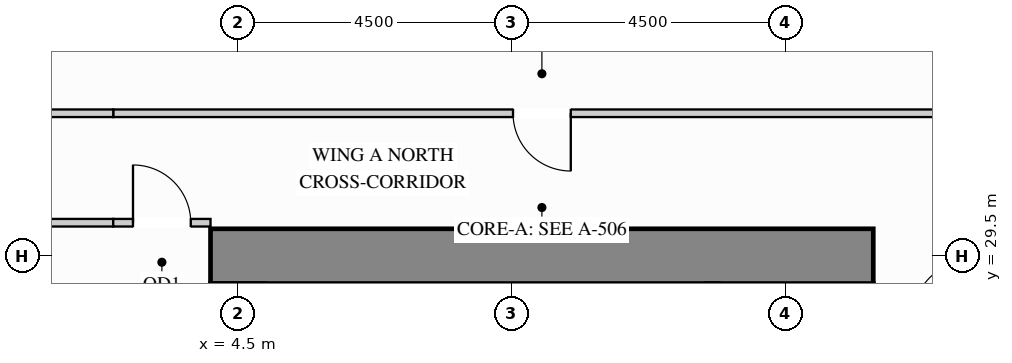
"""IFC4 building model, lengths in metres.
Left out: names, types, materials, properties, quantities, classifications, styles, units other than length and angle.
Written with IfcOpenShell. Run it as: python <this file> out.ifc"""

import sys

from ifc_helpers import new_model, si_unit, direction, frame, frame_2d, origin, place, context, subcontext, project, spatial, rectangle, extrude, source, transform, mapped, element, fill, save


model = new_model("IFC4")
c1 = context("Model", 3, precision=1e-05, world=origin(), true_north=direction((0.0, 1.0)))
c2 = subcontext(c1, "Body", "Model", "MODEL_VIEW")
j1 = project(units=[si_unit("LENGTHUNIT", "METRE"), si_unit("PLANEANGLEUNIT", "RADIAN")], contexts=[c1])
p1 = place(None, origin())
s1 = spatial("IfcSite", under=j1, at=p1, CompositionType="ELEMENT")
p2 = place(p1, origin())
s2 = spatial("IfcBuilding", under=s1, at=p2, CompositionType="ELEMENT")
p3 = place(p2, frame((0.0, 0.0, 51.3)))
s3 = spatial("IfcBuildingStorey", under=s2, at=p3, CompositionType="ELEMENT", Elevation=51.3)
m1 = source(origin(), c2, "Body", "SweptSolid", [
    extrude(rectangle(XDim=10.9, YDim=0.9, at=frame_2d((5.45, 0.0))), origin(), (0.0, 0.0, 1.0), 3.38),
])
p4 = place(p3, frame((4.05, 29.5, 0.0), z_axis=(0.0, 0.0, 1.0), x_axis=(1.0, 0.0, 0.0)))
e1 = element("IfcWall", 1, at=p4, inside=s3, PredefinedType="SHEAR", context=c2, shape_type="MappedRepresentation", body=[
    mapped(m1, transform((0.0, 0.0, 0.0), x_axis=(1.0, 0.0, 0.0), y_axis=(0.0, 1.0, 0.0), z_axis=(0.0, 0.0, 1.0))),
])
p5 = place(p3, frame((2.45, 31.85, 0.0), z_axis=(0.0, 0.0, 1.0), x_axis=(1.0, 0.0, 0.0)))
e2 = element("IfcWall", 2, at=p5, inside=s3, PredefinedType="PARTITIONING", context=c2, shape_type="SweptSolid", body=[
    extrude(rectangle(XDim=14.1, YDim=0.125, at=frame_2d((7.05, 0.0))), origin(), (0.0, 0.0, 1.0), 2.828),
])
p6 = place(p5, frame((6.575, 0.0, 0.0)))
e3 = element("IfcOpeningElement", 3, at=p6, cuts=e2, PredefinedType="OPENING", context=c2, shape_type="SweptSolid", body=[
    extrude(rectangle(XDim=0.95, YDim=2.15, at=frame_2d((0.475, 1.075))), frame((0.0, 0.073, 0.0), z_axis=(0.0, -1.0, 0.0), x_axis=(1.0, 0.0, 0.0)), (0.0, 0.0, 1.0), 0.145),
])
m2 = source(origin(), c2, "Body", "SweptSolid", [
    extrude(rectangle(XDim=2.098, YDim=0.125, at=frame_2d((1.049, 0.0))), origin(), (0.0, 0.0, 1.0), 2.828),
])
p7 = place(p3, frame((0.352, 31.85, 0.0), z_axis=(0.0, 0.0, 1.0), x_axis=(1.0, 0.0, 0.0)))
e4 = element("IfcWall", 4, at=p7, inside=s3, PredefinedType="PARTITIONING", context=c2, shape_type="MappedRepresentation", body=[
    mapped(m2, transform((0.0, 0.0, 0.0), x_axis=(1.0, 0.0, 0.0), y_axis=(0.0, 1.0, 0.0), z_axis=(0.0, 0.0, 1.0))),
])
m3 = source(origin(), c2, "Body", "SweptSolid", [
    extrude(rectangle(XDim=1.19, YDim=0.125, at=frame_2d((0.595, 0.0))), origin(), (0.0, 0.0, 1.0), 3.365),
])
p8 = place(p3, frame((1.26, 30.05, 0.0), z_axis=(0.0, 0.0, 1.0), x_axis=(1.0, 0.0, 0.0)))
e5 = element("IfcWall", 5, at=p8, inside=s3, PredefinedType="PARTITIONING", context=c2, shape_type="MappedRepresentation", body=[
    mapped(m3, transform((0.0, 0.0, 0.0), x_axis=(1.0, 0.0, 0.0), y_axis=(0.0, 1.0, 0.0), z_axis=(0.0, 0.0, 1.0))),
])
p9 = place(p3, frame((2.45, 30.05, 0.0), z_axis=(0.0, 0.0, 1.0), x_axis=(1.0, 0.0, 0.0)))
e6 = element("IfcWall", 6, at=p9, inside=s3, PredefinedType="PARTITIONING", context=c2, shape_type="SweptSolid", body=[
    extrude(rectangle(XDim=1.6, YDim=0.125, at=frame_2d((0.8, 0.0))), origin(), (0.0, 0.0, 1.0), 3.365),
])
p10 = place(p9, frame((0.325, 0.0, 0.0)))
e7 = element("IfcOpeningElement", 7, at=p10, cuts=e6, PredefinedType="OPENING", context=c2, shape_type="SweptSolid", body=[
    extrude(rectangle(XDim=0.95, YDim=2.15, at=frame_2d((0.475, 1.075))), frame((0.0, 0.073, 0.0), z_axis=(0.0, -1.0, 0.0), x_axis=(1.0, 0.0, 0.0)), (0.0, 0.0, 1.0), 0.145),
])
m4 = source(origin(), c2, "Body", "SweptSolid", [
    extrude(rectangle(XDim=0.95, YDim=2.15, at=frame_2d((0.475, 1.075))), frame((0.0, 0.025, 0.0), z_axis=(0.0, -1.0, 0.0), x_axis=(1.0, 0.0, 0.0)), (0.0, 0.0, 1.0), 0.05),
])
p11 = place(p6, origin())
e8 = element("IfcDoor", 8, at=p11, inside=s3, OperationType="SINGLE_SWING_RIGHT", PredefinedType="DOOR", context=c2, shape_type="MappedRepresentation", body=[
    mapped(m4, transform((0.0, 0.0, 0.0), x_axis=(1.0, 0.0, 0.0), y_axis=(0.0, 1.0, 0.0), z_axis=(0.0, 0.0, 1.0))),
])
fill(e3, e8)
p12 = place(p10, origin())
e9 = element("IfcDoor", 9, at=p12, inside=s3, OperationType="SINGLE_SWING_LEFT", PredefinedType="DOOR", context=c2, shape_type="MappedRepresentation", body=[
    mapped(m4, transform((0.0, 0.0, 0.0), x_axis=(1.0, 0.0, 0.0), y_axis=(0.0, 1.0, 0.0), z_axis=(0.0, 0.0, 1.0))),
])
fill(e7, e9)
save(model, sys.argv[1])
